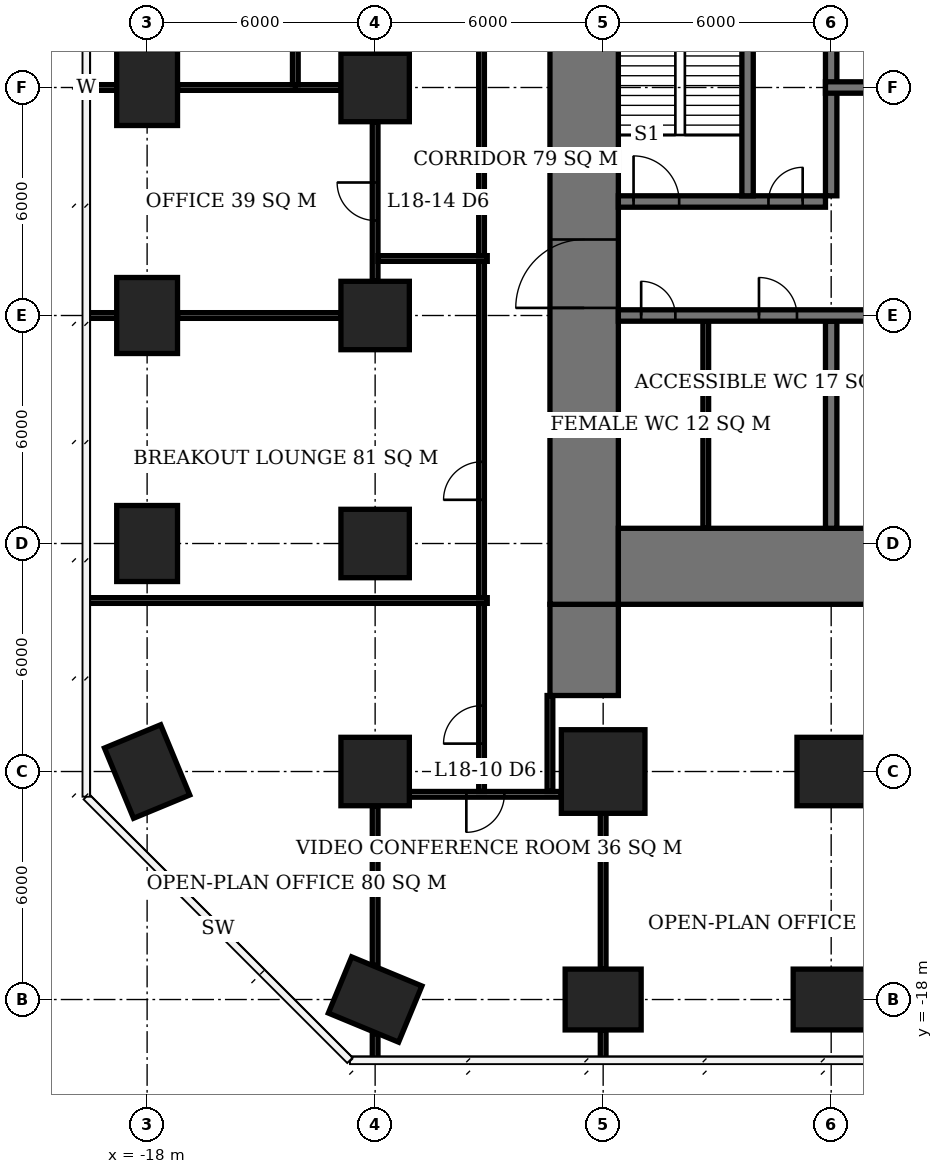
"""IFC4 building model, lengths in metres.
Left out: names, types, materials, properties, quantities, classifications, styles, units other than length and angle.
Written with IfcOpenShell. Run it as: python <this file> out.ifc"""

import sys

from ifc_helpers import new_model, si_unit, direction, frame, frame_2d, origin, origin_2d, place, context, subcontext, project, spatial, rectangle, extrude, element, fill, save


model = new_model("IFC4")
c1 = context("Model", 3, precision=1e-05, world=origin(), true_north=direction((0.0, 1.0)))
c2 = subcontext(c1, "Body", "Model", "MODEL_VIEW")
j1 = project(units=[si_unit("LENGTHUNIT", "METRE"), si_unit("PLANEANGLEUNIT", "RADIAN")], contexts=[c1])
p1 = place(None, origin())
s1 = spatial("IfcSite", under=j1, at=p1, CompositionType="ELEMENT")
p2 = place(p1, origin())
s2 = spatial("IfcBuilding", under=s1, at=p2, CompositionType="ELEMENT")
p3 = place(p2, frame((0.0, 0.0, 76.7)))
s3 = spatial("IfcBuildingStorey", under=s2, at=p3, CompositionType="ELEMENT", Elevation=76.7)
for number, where, z_axis, x_axis in (
    (1, (-18.0, -12.0, 0.0), (0.0, 0.0, 1.0), (-0.383, 0.924, 0.0)),
    (2, (-18.0, -6.0, 0.0), (0.0, 0.0, 1.0), (0.0, 1.0, 0.0)),
    (3, (-18.0, 0.0, 0.0), (0.0, 0.0, 1.0), (0.0, 1.0, 0.0)),
    (4, (-18.0, 6.0, 0.0), (0.0, 0.0, 1.0), (0.0, 1.0, 0.0)),
    (5, (-12.0, -18.0, 0.0), (0.0, 0.0, 1.0), (-0.924, 0.383, 0.0)),
):
    element("IfcColumn", number, at=place(p3, frame(where, z_axis=z_axis, x_axis=x_axis)), inside=s3, PredefinedType="COLUMN", context=c2, shape_type="SweptSolid", body=[
        extrude(rectangle(XDim=2.0, YDim=1.6, at=origin_2d()), origin(), (0.0, 0.0, 1.0), 3.9),
    ])
for number, where, z_axis, x_axis in (
    (6, (-12.0, -12.0, 0.0), (0.0, 0.0, 1.0), (1.0, 0.0, 0.0)),
    (7, (-12.0, -6.0, 0.0), (0.0, 0.0, 1.0), (1.0, 0.0, 0.0)),
    (8, (-12.0, 0.0, 0.0), (0.0, 0.0, 1.0), (1.0, 0.0, 0.0)),
    (9, (-12.0, 6.0, 0.0), (0.0, 0.0, 1.0), (1.0, 0.0, 0.0)),
):
    element("IfcColumn", number, at=place(p3, frame(where, z_axis=z_axis, x_axis=x_axis)), inside=s3, PredefinedType="COLUMN", context=c2, shape_type="SweptSolid", body=[
        extrude(rectangle(XDim=1.8, YDim=1.8, at=origin_2d()), origin(), (0.0, 0.0, 1.0), 3.9),
    ])
p4 = place(p3, frame((-6.0, -18.0, 0.0), z_axis=(0.0, 0.0, 1.0), x_axis=(1.0, 0.0, 0.0)))
e10 = element("IfcColumn", 10, at=p4, inside=s3, PredefinedType="COLUMN", context=c2, shape_type="SweptSolid", body=[
    extrude(rectangle(XDim=2.0, YDim=1.6, at=origin_2d()), origin(), (0.0, 0.0, 1.0), 3.9),
])
p5 = place(p3, frame((-6.0, -12.0, 0.0), z_axis=(0.0, 0.0, 1.0), x_axis=(1.0, 0.0, 0.0)))
e11 = element("IfcColumn", 11, at=p5, inside=s3, PredefinedType="COLUMN", context=c2, shape_type="SweptSolid", body=[
    extrude(rectangle(XDim=2.2, YDim=2.2, at=origin_2d()), origin(), (0.0, 0.0, 1.0), 3.9),
])
p6 = place(p3, frame((0.0, -18.0, 0.0), z_axis=(0.0, 0.0, 1.0), x_axis=(1.0, 0.0, 0.0)))
e12 = element("IfcColumn", 12, at=p6, inside=s3, PredefinedType="COLUMN", context=c2, shape_type="SweptSolid", body=[
    extrude(rectangle(XDim=2.0, YDim=1.6, at=origin_2d()), origin(), (0.0, 0.0, 1.0), 3.9),
])
p7 = place(p3, frame((0.0, -12.0, 0.0), z_axis=(0.0, 0.0, 1.0), x_axis=(1.0, 0.0, 0.0)))
e13 = element("IfcColumn", 13, at=p7, inside=s3, PredefinedType="COLUMN", context=c2, shape_type="SweptSolid", body=[
    extrude(rectangle(XDim=1.8, YDim=1.8, at=origin_2d()), origin(), (0.0, 0.0, 1.0), 3.9),
])
p8 = place(p3, frame((-5.6, -6.6, 0.0), z_axis=(0.0, 0.0, 1.0), x_axis=(1.0, 0.0, 0.0)))
e14 = element("IfcWall", 14, at=p8, inside=s3, PredefinedType="SHEAR", context=c2, shape_type="SweptSolid", body=[
    extrude(rectangle(XDim=23.2, YDim=2.0, at=frame_2d((11.6, 0.0))), origin(), (0.0, 0.0, 1.0), 3.9),
])
p9 = place(p3, frame((-6.5, -7.6, 0.0), z_axis=(0.0, 0.0, 1.0), x_axis=(0.0, 1.0, 0.0)))
e15 = element("IfcWall", 15, at=p9, inside=s3, PredefinedType="SHEAR", context=c2, shape_type="SweptSolid", body=[
    extrude(rectangle(XDim=21.2, YDim=1.8, at=frame_2d((10.6, 0.0))), origin(), (0.0, 0.0, 1.0), 3.9),
])
p10 = place(p9, frame((7.8, 0.0, 0.0)))
e16 = element("IfcOpeningElement", 16, at=p10, cuts=e15, PredefinedType="OPENING", context=c2, shape_type="SweptSolid", body=[
    extrude(rectangle(XDim=1.8, YDim=2.4, at=frame_2d((0.9, 1.2))), frame((0.0, 0.91, 0.0), z_axis=(0.0, -1.0, 0.0), x_axis=(1.0, 0.0, 0.0)), (0.0, 0.0, 1.0), 1.82),
])
p11 = place(p3, frame((-6.5, -10.0, 0.0), z_axis=(0.0, 0.0, 1.0), x_axis=(0.0, 1.0, 0.0)))
e17 = element("IfcWall", 17, at=p11, inside=s3, PredefinedType="SHEAR", context=c2, shape_type="SweptSolid", body=[
    extrude(rectangle(XDim=2.4, YDim=1.8, at=frame_2d((1.2, 0.0))), origin(), (0.0, 0.0, 1.0), 3.9),
])
p12 = place(p3, frame((-5.6, 0.0, 0.0), z_axis=(0.0, 0.0, 1.0), x_axis=(1.0, 0.0, 0.0)))
e18 = element("IfcWall", 18, at=p12, inside=s3, PredefinedType="SHEAR", context=c2, shape_type="SweptSolid", body=[
    extrude(rectangle(XDim=17.75, YDim=0.3, at=frame_2d((8.875, 0.0))), origin(), (0.0, 0.0, 1.0), 3.9),
])
p13 = place(p12, frame((0.6, 0.0, 0.0)))
e19 = element("IfcOpeningElement", 19, at=p13, cuts=e18, PredefinedType="OPENING", context=c2, shape_type="SweptSolid", body=[
    extrude(rectangle(XDim=0.9, YDim=2.1, at=frame_2d((0.45, 1.05))), frame((0.0, 0.16, 0.0), z_axis=(0.0, -1.0, 0.0), x_axis=(1.0, 0.0, 0.0)), (0.0, 0.0, 1.0), 0.32),
])
p14 = place(p12, frame((3.7, 0.0, 0.0)))
e20 = element("IfcOpeningElement", 20, at=p14, cuts=e18, PredefinedType="OPENING", context=c2, shape_type="SweptSolid", body=[
    extrude(rectangle(XDim=1.0, YDim=2.1, at=frame_2d((0.5, 1.05))), frame((0.0, 0.16, 0.0), z_axis=(0.0, -1.0, 0.0), x_axis=(1.0, 0.0, 0.0)), (0.0, 0.0, 1.0), 0.32),
])
p15 = place(p3, frame((-5.6, 3.0, 0.0), z_axis=(0.0, 0.0, 1.0), x_axis=(1.0, 0.0, 0.0)))
e21 = element("IfcWall", 21, at=p15, inside=s3, PredefinedType="SHEAR", context=c2, shape_type="SweptSolid", body=[
    extrude(rectangle(XDim=5.45, YDim=0.3, at=frame_2d((2.725, 0.0))), origin(), (0.0, 0.0, 1.0), 3.9),
])
p16 = place(p15, frame((0.4, 0.0, 0.0)))
e22 = element("IfcOpeningElement", 22, at=p16, cuts=e21, PredefinedType="OPENING", context=c2, shape_type="SweptSolid", body=[
    extrude(rectangle(XDim=1.2, YDim=2.1, at=frame_2d((0.6, 1.05))), frame((0.0, 0.16, 0.0), z_axis=(0.0, -1.0, 0.0), x_axis=(1.0, 0.0, 0.0)), (0.0, 0.0, 1.0), 0.32),
])
p17 = place(p15, frame((3.95, 0.0, 0.0)))
e23 = element("IfcOpeningElement", 23, at=p17, cuts=e21, PredefinedType="OPENING", context=c2, shape_type="SweptSolid", body=[
    extrude(rectangle(XDim=0.9, YDim=2.1, at=frame_2d((0.45, 1.05))), frame((0.0, 0.16, 0.0), z_axis=(0.0, -1.0, 0.0), x_axis=(1.0, 0.0, 0.0)), (0.0, 0.0, 1.0), 0.32),
])
p18 = place(p3, frame((-0.15, 6.0, 0.0), z_axis=(0.0, 0.0, 1.0), x_axis=(1.0, 0.0, 0.0)))
e24 = element("IfcWall", 24, at=p18, inside=s3, PredefinedType="SHEAR", context=c2, shape_type="SweptSolid", body=[
    extrude(rectangle(XDim=17.75, YDim=0.3, at=frame_2d((8.875, 0.0))), origin(), (0.0, 0.0, 1.0), 3.9),
])
p19 = place(p18, frame((13.15, 0.0, 0.0)))
e25 = element("IfcOpeningElement", 25, at=p19, cuts=e24, PredefinedType="OPENING", context=c2, shape_type="SweptSolid", body=[
    extrude(rectangle(XDim=0.9, YDim=2.1, at=frame_2d((0.45, 1.05))), frame((0.0, 0.16, 0.0), z_axis=(0.0, -1.0, 0.0), x_axis=(1.0, 0.0, 0.0)), (0.0, 0.0, 1.0), 0.32),
])
p20 = place(p18, frame((1.1, 0.0, 0.0)))
e26 = element("IfcOpeningElement", 26, at=p20, cuts=e24, PredefinedType="OPENING", context=c2, shape_type="SweptSolid", body=[
    extrude(rectangle(XDim=1.1, YDim=2.1, at=frame_2d((0.55, 1.05))), frame((0.0, 0.16, 0.0), z_axis=(0.0, -1.0, 0.0), x_axis=(1.0, 0.0, 0.0)), (0.0, 0.0, 1.0), 0.32),
])
p21 = place(p18, frame((4.1, 0.0, 0.0)))
e27 = element("IfcOpeningElement", 27, at=p21, cuts=e24, PredefinedType="OPENING", context=c2, shape_type="SweptSolid", body=[
    extrude(rectangle(XDim=1.1, YDim=2.1, at=frame_2d((0.55, 1.05))), frame((0.0, 0.16, 0.0), z_axis=(0.0, -1.0, 0.0), x_axis=(1.0, 0.0, 0.0)), (0.0, 0.0, 1.0), 0.32),
])
p22 = place(p18, frame((7.1, 0.0, 0.0)))
e28 = element("IfcOpeningElement", 28, at=p22, cuts=e24, PredefinedType="OPENING", context=c2, shape_type="SweptSolid", body=[
    extrude(rectangle(XDim=1.1, YDim=2.1, at=frame_2d((0.55, 1.05))), frame((0.0, 0.16, 0.0), z_axis=(0.0, -1.0, 0.0), x_axis=(1.0, 0.0, 0.0)), (0.0, 0.0, 1.0), 0.32),
])
p23 = place(p18, frame((10.1, 0.0, 0.0)))
e29 = element("IfcOpeningElement", 29, at=p23, cuts=e24, PredefinedType="OPENING", context=c2, shape_type="SweptSolid", body=[
    extrude(rectangle(XDim=1.1, YDim=2.1, at=frame_2d((0.55, 1.05))), frame((0.0, 0.16, 0.0), z_axis=(0.0, -1.0, 0.0), x_axis=(1.0, 0.0, 0.0)), (0.0, 0.0, 1.0), 0.32),
])
p24 = place(p3, frame((0.0, -5.6, 0.0), z_axis=(0.0, 0.0, 1.0), x_axis=(0.0, 1.0, 0.0)))
e30 = element("IfcWall", 30, at=p24, inside=s3, PredefinedType="SHEAR", context=c2, shape_type="SweptSolid", body=[
    extrude(rectangle(XDim=5.45, YDim=0.3, at=frame_2d((2.725, 0.0))), origin(), (0.0, 0.0, 1.0), 3.9),
])
for number, where, z_axis, x_axis in (
    (31, (0.0, 3.15, 0.0), (0.0, 0.0, 1.0), (0.0, 1.0, 0.0)),
    (32, (-2.2, 3.15, 0.0), (0.0, 0.0, 1.0), (0.0, 1.0, 0.0)),
):
    element("IfcWall", number, at=place(p3, frame(where, z_axis=z_axis, x_axis=x_axis)), inside=s3, PredefinedType="SHEAR", context=c2, shape_type="SweptSolid", body=[
        extrude(rectangle(XDim=8.45, YDim=0.3, at=frame_2d((4.225, 0.0))), origin(), (0.0, 0.0, 1.0), 3.9),
    ])
p25 = place(p3, frame((-3.3, -5.6, 0.0), z_axis=(0.0, 0.0, 1.0), x_axis=(0.0, 1.0, 0.0)))
e33 = element("IfcWall", 33, at=p25, inside=s3, PredefinedType="PLUMBINGWALL", context=c2, shape_type="SweptSolid", body=[
    extrude(rectangle(XDim=5.45, YDim=0.15, at=frame_2d((2.725, 0.0))), origin(), (0.0, 0.0, 1.0), 3.65),
])
p26 = place(p3, frame((-7.1, -12.6, 0.0), z_axis=(0.0, 0.0, 1.0), x_axis=(-1.0, 0.0, 0.0)))
e34 = element("IfcWall", 34, at=p26, inside=s3, PredefinedType="PARTITIONING", context=c2, shape_type="SweptSolid", body=[
    extrude(rectangle(XDim=4.0, YDim=0.15, at=frame_2d((2.0, 0.0))), origin(), (0.0, 0.0, 1.0), 3.65),
])
p27 = place(p26, frame((1.5, 0.0, 0.0)))
e35 = element("IfcOpeningElement", 35, at=p27, cuts=e34, PredefinedType="OPENING", context=c2, shape_type="SweptSolid", body=[
    extrude(rectangle(XDim=1.0, YDim=2.1, at=frame_2d((0.5, 1.05))), frame((0.0, 0.085, 0.0), z_axis=(0.0, -1.0, 0.0), x_axis=(1.0, 0.0, 0.0)), (0.0, 0.0, 1.0), 0.17),
])
p28 = place(p3, frame((-19.6, 0.0, 0.0), z_axis=(0.0, 0.0, 1.0), x_axis=(1.0, 0.0, 0.0)))
e36 = element("IfcWall", 36, at=p28, inside=s3, PredefinedType="PARTITIONING", context=c2, shape_type="SweptSolid", body=[
    extrude(rectangle(XDim=0.8, YDim=0.15, at=frame_2d((0.4, 0.0))), origin(), (0.0, 0.0, 1.0), 3.65),
])
p29 = place(p3, frame((-17.2, 0.0, 0.0), z_axis=(0.0, 0.0, 1.0), x_axis=(1.0, 0.0, 0.0)))
e37 = element("IfcWall", 37, at=p29, inside=s3, PredefinedType="PARTITIONING", context=c2, shape_type="SweptSolid", body=[
    extrude(rectangle(XDim=4.3, YDim=0.15, at=frame_2d((2.15, 0.0))), origin(), (0.0, 0.0, 1.0), 3.65),
])
p30 = place(p3, frame((-19.55, 6.0, 0.0), z_axis=(0.0, 0.0, 1.0), x_axis=(1.0, 0.0, 0.0)))
e38 = element("IfcWall", 38, at=p30, inside=s3, PredefinedType="PARTITIONING", context=c2, shape_type="SweptSolid", body=[
    extrude(rectangle(XDim=0.75, YDim=0.15, at=frame_2d((0.375, 0.0))), origin(), (0.0, 0.0, 1.0), 3.65),
])
p31 = place(p3, frame((-17.2, 6.0, 0.0), z_axis=(0.0, 0.0, 1.0), x_axis=(1.0, 0.0, 0.0)))
e39 = element("IfcWall", 39, at=p31, inside=s3, PredefinedType="PARTITIONING", context=c2, shape_type="SweptSolid", body=[
    extrude(rectangle(XDim=3.175, YDim=0.15, at=frame_2d((1.587, 0.0))), origin(), (0.0, 0.0, 1.0), 3.65),
])
p32 = place(p3, frame((-14.1, 6.0, 0.0), z_axis=(0.0, 0.0, 1.0), x_axis=(1.0, 0.0, 0.0)))
e40 = element("IfcWall", 40, at=p32, inside=s3, PredefinedType="PARTITIONING", context=c2, shape_type="SweptSolid", body=[
    extrude(rectangle(XDim=1.2, YDim=0.15, at=frame_2d((0.6, 0.0))), origin(), (0.0, 0.0, 1.0), 3.65),
])
p33 = place(p3, frame((-14.1, 6.075, 0.0), z_axis=(0.0, 0.0, 1.0), x_axis=(0.0, 1.0, 0.0)))
e41 = element("IfcWall", 41, at=p33, inside=s3, PredefinedType="PARTITIONING", context=c2, shape_type="SweptSolid", body=[
    extrude(rectangle(XDim=5.85, YDim=0.15, at=frame_2d((2.925, 0.0))), origin(), (0.0, 0.0, 1.0), 3.65),
])
p34 = place(p33, frame((2.425, 0.0, 0.0)))
e42 = element("IfcOpeningElement", 42, at=p34, cuts=e41, PredefinedType="OPENING", context=c2, shape_type="SweptSolid", body=[
    extrude(rectangle(XDim=1.0, YDim=2.1, at=frame_2d((0.5, 1.05))), frame((0.0, 0.085, 0.0), z_axis=(0.0, -1.0, 0.0), x_axis=(1.0, 0.0, 0.0)), (0.0, 0.0, 1.0), 0.17),
])
p35 = place(p3, frame((-12.0, -19.6, 0.0), z_axis=(0.0, 0.0, 1.0), x_axis=(0.0, 1.0, 0.0)))
e43 = element("IfcWall", 43, at=p35, inside=s3, PredefinedType="PARTITIONING", context=c2, shape_type="SweptSolid", body=[
    extrude(rectangle(XDim=0.703, YDim=0.15, at=frame_2d((0.352, 0.0))), origin(), (0.0, 0.0, 1.0), 3.65),
])
p36 = place(p3, frame((-12.0, -17.103, 0.0), z_axis=(0.0, 0.0, 1.0), x_axis=(0.0, 1.0, 0.0)))
e44 = element("IfcWall", 44, at=p36, inside=s3, PredefinedType="PARTITIONING", context=c2, shape_type="SweptSolid", body=[
    extrude(rectangle(XDim=4.203, YDim=0.15, at=frame_2d((2.102, 0.0))), origin(), (0.0, 0.0, 1.0), 3.65),
])
p37 = place(p3, frame((-12.0, 0.9, 0.0), z_axis=(0.0, 0.0, 1.0), x_axis=(0.0, 1.0, 0.0)))
e45 = element("IfcWall", 45, at=p37, inside=s3, PredefinedType="PARTITIONING", context=c2, shape_type="SweptSolid", body=[
    extrude(rectangle(XDim=4.2, YDim=0.15, at=frame_2d((2.1, 0.0))), origin(), (0.0, 0.0, 1.0), 3.65),
])
p38 = place(p37, frame((1.6, 0.0, 0.0)))
e46 = element("IfcOpeningElement", 46, at=p38, cuts=e45, PredefinedType="OPENING", context=c2, shape_type="SweptSolid", body=[
    extrude(rectangle(XDim=1.0, YDim=2.1, at=frame_2d((0.5, 1.05))), frame((0.0, 0.085, 0.0), z_axis=(0.0, -1.0, 0.0), x_axis=(1.0, 0.0, 0.0)), (0.0, 0.0, 1.0), 0.17),
])
p39 = place(p3, frame((-6.0, -19.6, 0.0), z_axis=(0.0, 0.0, 1.0), x_axis=(0.0, 1.0, 0.0)))
e47 = element("IfcWall", 47, at=p39, inside=s3, PredefinedType="PARTITIONING", context=c2, shape_type="SweptSolid", body=[
    extrude(rectangle(XDim=0.8, YDim=0.15, at=frame_2d((0.4, 0.0))), origin(), (0.0, 0.0, 1.0), 3.65),
])
p40 = place(p3, frame((-6.0, -17.2, 0.0), z_axis=(0.0, 0.0, 1.0), x_axis=(0.0, 1.0, 0.0)))
e48 = element("IfcWall", 48, at=p40, inside=s3, PredefinedType="PARTITIONING", context=c2, shape_type="SweptSolid", body=[
    extrude(rectangle(XDim=4.1, YDim=0.15, at=frame_2d((2.05, 0.0))), origin(), (0.0, 0.0, 1.0), 3.65),
])
p41 = place(p3, frame((-19.6, -7.5, 0.0), z_axis=(0.0, 0.0, 1.0), x_axis=(1.0, 0.0, 0.0)))
e49 = element("IfcWall", 49, at=p41, inside=s3, PredefinedType="PARTITIONING", context=c2, shape_type="SweptSolid", body=[
    extrude(rectangle(XDim=10.55, YDim=0.15, at=frame_2d((5.275, 0.0))), origin(), (0.0, 0.0, 1.0), 3.65),
])
p42 = place(p3, frame((-11.925, 1.5, 0.0), z_axis=(0.0, 0.0, 1.0), x_axis=(1.0, 0.0, 0.0)))
e50 = element("IfcWall", 50, at=p42, inside=s3, PredefinedType="PARTITIONING", context=c2, shape_type="SweptSolid", body=[
    extrude(rectangle(XDim=2.875, YDim=0.15, at=frame_2d((1.438, 0.0))), origin(), (0.0, 0.0, 1.0), 3.65),
])
p43 = place(p3, frame((-9.2, -12.525, 0.0), z_axis=(0.0, 0.0, 1.0), x_axis=(0.0, 1.0, 0.0)))
e51 = element("IfcWall", 51, at=p43, inside=s3, PredefinedType="PARTITIONING", context=c2, shape_type="SweptSolid", body=[
    extrude(rectangle(XDim=4.95, YDim=0.15, at=frame_2d((2.475, 0.0))), origin(), (0.0, 0.0, 1.0), 3.65),
])
p44 = place(p43, frame((1.259, 0.0, 0.0)))
e52 = element("IfcOpeningElement", 52, at=p44, cuts=e51, PredefinedType="OPENING", context=c2, shape_type="SweptSolid", body=[
    extrude(rectangle(XDim=1.0, YDim=2.1, at=frame_2d((0.5, 1.05))), frame((0.0, 0.085, 0.0), z_axis=(0.0, -1.0, 0.0), x_axis=(1.0, 0.0, 0.0)), (0.0, 0.0, 1.0), 0.17),
])
p45 = place(p3, frame((-9.2, -7.425, 0.0), z_axis=(0.0, 0.0, 1.0), x_axis=(0.0, 1.0, 0.0)))
e53 = element("IfcWall", 53, at=p45, inside=s3, PredefinedType="PARTITIONING", context=c2, shape_type="SweptSolid", body=[
    extrude(rectangle(XDim=8.85, YDim=0.15, at=frame_2d((4.425, 0.0))), origin(), (0.0, 0.0, 1.0), 3.65),
])
p46 = place(p45, frame((2.575, 0.0, 0.0)))
e54 = element("IfcOpeningElement", 54, at=p46, cuts=e53, PredefinedType="OPENING", context=c2, shape_type="SweptSolid", body=[
    extrude(rectangle(XDim=1.0, YDim=2.1, at=frame_2d((0.5, 1.05))), frame((0.0, 0.085, 0.0), z_axis=(0.0, -1.0, 0.0), x_axis=(1.0, 0.0, 0.0)), (0.0, 0.0, 1.0), 0.17),
])
p47 = place(p3, frame((-9.2, 1.575, 0.0), z_axis=(0.0, 0.0, 1.0), x_axis=(0.0, 1.0, 0.0)))
e55 = element("IfcWall", 55, at=p47, inside=s3, PredefinedType="PARTITIONING", context=c2, shape_type="SweptSolid", body=[
    extrude(rectangle(XDim=26.015, YDim=0.15, at=frame_2d((13.008, 0.0))), origin(), (0.0, 0.0, 1.0), 3.65),
])
p48 = place(p47, frame((9.925, 0.0, 0.0)))
e56 = element("IfcOpeningElement", 56, at=p48, cuts=e55, PredefinedType="OPENING", context=c2, shape_type="SweptSolid", body=[
    extrude(rectangle(XDim=1.0, YDim=2.1, at=frame_2d((0.5, 1.05))), frame((0.0, 0.085, 0.0), z_axis=(0.0, -1.0, 0.0), x_axis=(1.0, 0.0, 0.0)), (0.0, 0.0, 1.0), 0.17),
])
p49 = place(p3, frame((-7.4, -12.525, 0.0), z_axis=(0.0, 0.0, 1.0), x_axis=(0.0, 1.0, 0.0)))
e57 = element("IfcWall", 57, at=p49, inside=s3, PredefinedType="PARTITIONING", context=c2, shape_type="SweptSolid", body=[
    extrude(rectangle(XDim=2.525, YDim=0.15, at=frame_2d((1.262, 0.0))), origin(), (0.0, 0.0, 1.0), 3.65),
])
p50 = place(p10, origin())
e58 = element("IfcDoor", 58, at=p50, inside=s3, OperationType="DOUBLE_DOOR_SINGLE_SWING", PredefinedType="DOOR", context=c2, shape_type="SweptSolid", body=[
    extrude(rectangle(XDim=1.8, YDim=2.4, at=frame_2d((0.9, 1.2))), frame((0.0, 0.025, 0.0), z_axis=(0.0, -1.0, 0.0), x_axis=(1.0, 0.0, 0.0)), (0.0, 0.0, 1.0), 0.05),
])
fill(e16, e58)
p51 = place(p16, origin())
e59 = element("IfcDoor", 59, at=p51, inside=s3, OperationType="SINGLE_SWING_LEFT", PredefinedType="DOOR", context=c2, shape_type="SweptSolid", body=[
    extrude(rectangle(XDim=1.2, YDim=2.1, at=frame_2d((0.6, 1.05))), frame((0.0, 0.025, 0.0), z_axis=(0.0, -1.0, 0.0), x_axis=(1.0, 0.0, 0.0)), (0.0, 0.0, 1.0), 0.05),
])
fill(e22, e59)
p52 = place(p17, origin())
e60 = element("IfcDoor", 60, at=p52, inside=s3, OperationType="SINGLE_SWING_RIGHT", PredefinedType="DOOR", context=c2, shape_type="SweptSolid", body=[
    extrude(rectangle(XDim=0.9, YDim=2.1, at=frame_2d((0.45, 1.05))), frame((0.0, 0.025, 0.0), z_axis=(0.0, -1.0, 0.0), x_axis=(1.0, 0.0, 0.0)), (0.0, 0.0, 1.0), 0.05),
])
fill(e23, e60)
p53 = place(p13, origin())
e61 = element("IfcDoor", 61, at=p53, inside=s3, OperationType="SINGLE_SWING_LEFT", PredefinedType="DOOR", context=c2, shape_type="SweptSolid", body=[
    extrude(rectangle(XDim=0.9, YDim=2.1, at=frame_2d((0.45, 1.05))), frame((0.0, 0.025, 0.0), z_axis=(0.0, -1.0, 0.0), x_axis=(1.0, 0.0, 0.0)), (0.0, 0.0, 1.0), 0.05),
])
fill(e19, e61)
p54 = place(p14, origin())
e62 = element("IfcDoor", 62, at=p54, inside=s3, OperationType="SINGLE_SWING_LEFT", PredefinedType="DOOR", context=c2, shape_type="SweptSolid", body=[
    extrude(rectangle(XDim=1.0, YDim=2.1, at=frame_2d((0.5, 1.05))), frame((0.0, 0.025, 0.0), z_axis=(0.0, -1.0, 0.0), x_axis=(1.0, 0.0, 0.0)), (0.0, 0.0, 1.0), 0.05),
])
fill(e20, e62)
p55 = place(p27, origin())
e63 = element("IfcDoor", 63, at=p55, inside=s3, OperationType="SINGLE_SWING_RIGHT", PredefinedType="DOOR", context=c2, shape_type="SweptSolid", body=[
    extrude(rectangle(XDim=1.0, YDim=2.1, at=frame_2d((0.5, 1.05))), frame((0.0, 0.025, 0.0), z_axis=(0.0, -1.0, 0.0), x_axis=(1.0, 0.0, 0.0)), (0.0, 0.0, 1.0), 0.05),
])
fill(e35, e63)
p56 = place(p38, origin())
e64 = element("IfcDoor", 64, at=p56, inside=s3, OperationType="SINGLE_SWING_RIGHT", PredefinedType="DOOR", context=c2, shape_type="SweptSolid", body=[
    extrude(rectangle(XDim=1.0, YDim=2.1, at=frame_2d((0.5, 1.05))), frame((0.0, 0.025, 0.0), z_axis=(0.0, -1.0, 0.0), x_axis=(1.0, 0.0, 0.0)), (0.0, 0.0, 1.0), 0.05),
])
fill(e46, e64)
p57 = place(p44, origin())
e65 = element("IfcDoor", 65, at=p57, inside=s3, OperationType="SINGLE_SWING_LEFT", PredefinedType="DOOR", context=c2, shape_type="SweptSolid", body=[
    extrude(rectangle(XDim=1.0, YDim=2.1, at=frame_2d((0.5, 1.05))), frame((0.0, 0.025, 0.0), z_axis=(0.0, -1.0, 0.0), x_axis=(1.0, 0.0, 0.0)), (0.0, 0.0, 1.0), 0.05),
])
fill(e52, e65)
p58 = place(p46, origin())
e66 = element("IfcDoor", 66, at=p58, inside=s3, OperationType="SINGLE_SWING_LEFT", PredefinedType="DOOR", context=c2, shape_type="SweptSolid", body=[
    extrude(rectangle(XDim=1.0, YDim=2.1, at=frame_2d((0.5, 1.05))), frame((0.0, 0.025, 0.0), z_axis=(0.0, -1.0, 0.0), x_axis=(1.0, 0.0, 0.0)), (0.0, 0.0, 1.0), 0.05),
])
fill(e54, e66)
save(model, sys.argv[1])
